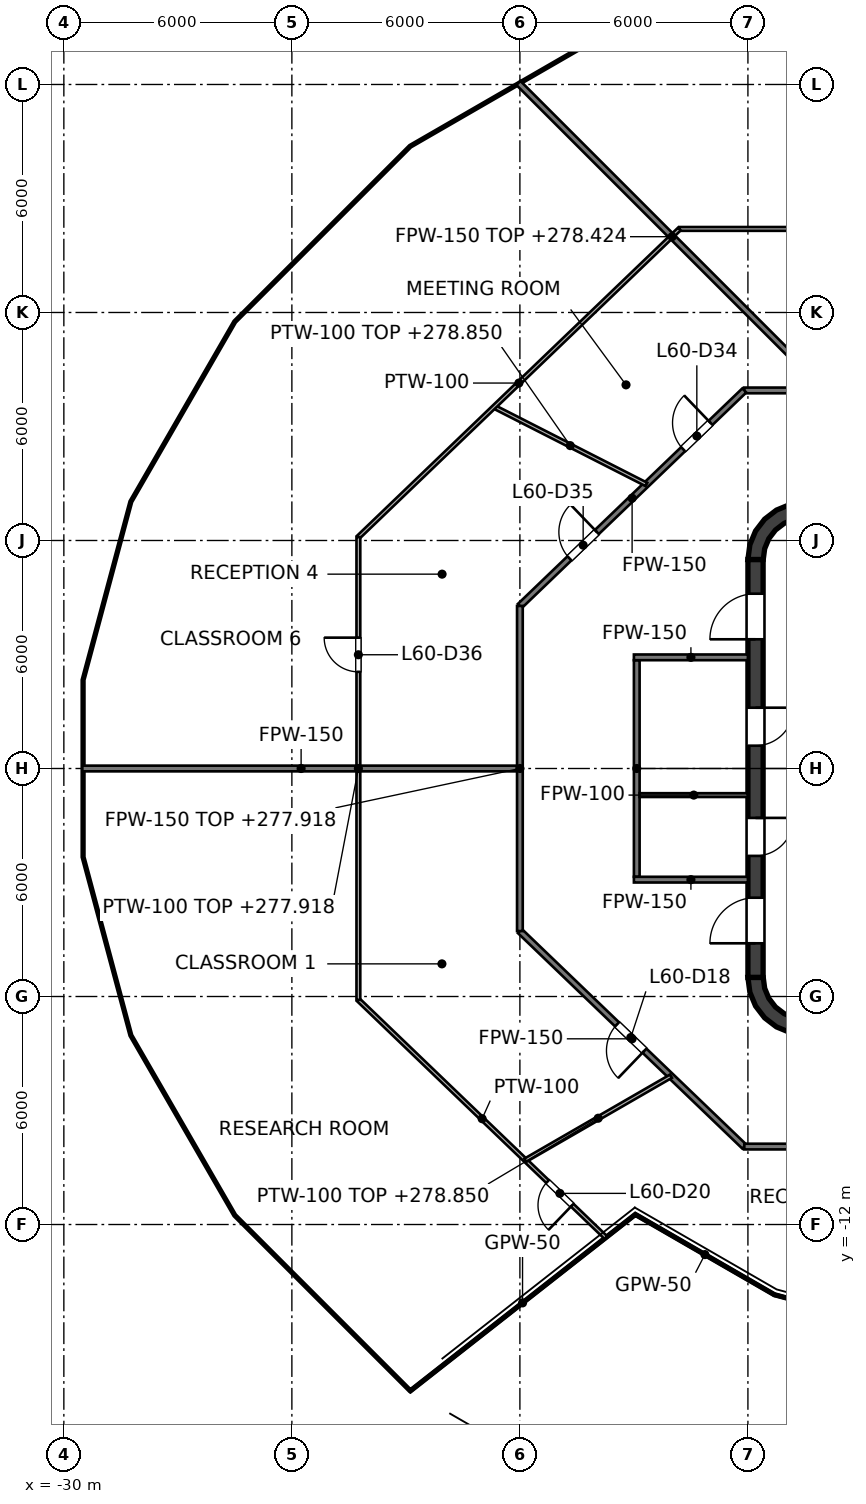
"""IFC4 building model, lengths in metres.
Left out: names, types, materials, properties, quantities, classifications, styles, units other than length and angle.
Written with IfcOpenShell. Run it as: python <this file> out.ifc"""

import sys

from ifc_helpers import new_model, si_unit, direction, frame, frame_2d, origin, place, context, subcontext, project, spatial, polyline, rectangle, outline, extrude, element, fill, save


model = new_model("IFC4")
c1 = context("Model", 3, precision=1e-05, world=origin(), true_north=direction((0.0, 1.0)))
c2 = subcontext(c1, "Body", "Model", "MODEL_VIEW")
j1 = project(units=[si_unit("LENGTHUNIT", "METRE"), si_unit("PLANEANGLEUNIT", "RADIAN")], contexts=[c1])
p1 = place(None, origin())
s1 = spatial("IfcSite", under=j1, at=p1, CompositionType="ELEMENT")
p2 = place(p1, origin())
s2 = spatial("IfcBuilding", under=s1, at=p2, CompositionType="ELEMENT")
p3 = place(p2, frame((0.0, 0.0, 275.0)))
s3 = spatial("IfcBuildingStorey", under=s2, at=p3, CompositionType="ELEMENT", Elevation=275.0)
p4 = place(p3, frame((-11.8, -5.5, 0.0), z_axis=(0.0, 0.0, 1.0), x_axis=(0.0, 1.0, 0.0)))
e1 = element("IfcWall", 1, at=p4, inside=s3, PredefinedType="SHEAR", context=c2, shape_type="SweptSolid", body=[
    extrude(rectangle(XDim=11.0, YDim=0.4, at=frame_2d((5.5, 0.0))), origin(), (0.0, 0.0, 1.0), 4.0),
])
p5 = place(p4, frame((3.2, 0.0, 0.0)))
e2 = element("IfcOpeningElement", 2, at=p5, cuts=e1, PredefinedType="OPENING", context=c2, shape_type="SweptSolid", body=[
    extrude(rectangle(XDim=1.0, YDim=2.1, at=frame_2d((0.5, 1.05))), frame((0.0, 0.2, 0.0), z_axis=(0.0, -1.0, 0.0), x_axis=(1.0, 0.0, 0.0)), (0.0, 0.0, 1.0), 0.4),
])
p6 = place(p4, frame((6.1, 0.0, 0.0)))
e3 = element("IfcOpeningElement", 3, at=p6, cuts=e1, PredefinedType="OPENING", context=c2, shape_type="SweptSolid", body=[
    extrude(rectangle(XDim=1.0, YDim=2.1, at=frame_2d((0.5, 1.05))), frame((0.0, 0.2, 0.0), z_axis=(0.0, -1.0, 0.0), x_axis=(1.0, 0.0, 0.0)), (0.0, 0.0, 1.0), 0.4),
])
p7 = place(p4, frame((0.9, 0.0, 0.0)))
e4 = element("IfcOpeningElement", 4, at=p7, cuts=e1, PredefinedType="OPENING", context=c2, shape_type="SweptSolid", body=[
    extrude(rectangle(XDim=1.2, YDim=2.1, at=frame_2d((0.6, 1.05))), frame((0.0, 0.2, 0.0), z_axis=(0.0, -1.0, 0.0), x_axis=(1.0, 0.0, 0.0)), (0.0, 0.0, 1.0), 0.4),
])
p8 = place(p4, frame((8.9, 0.0, 0.0)))
e5 = element("IfcOpeningElement", 5, at=p8, cuts=e1, PredefinedType="OPENING", context=c2, shape_type="SweptSolid", body=[
    extrude(rectangle(XDim=1.2, YDim=2.1, at=frame_2d((0.6, 1.05))), frame((0.0, 0.2, 0.0), z_axis=(0.0, -1.0, 0.0), x_axis=(1.0, 0.0, 0.0)), (0.0, 0.0, 1.0), 0.4),
])
p9 = place(p3, origin())
e6 = element("IfcWall", 6, at=p9, inside=s3, PredefinedType="SHEAR", context=c2, shape_type="SweptSolid", body=[
    extrude(outline(polyline([(-12.0, 5.5), (-11.596, 5.5), (-11.559, 5.784), (-11.45, 6.048), (-11.275, 6.275), (-11.048, 6.45), (-10.784, 6.559), (-10.5, 6.596), (-10.5, 7.0), (-10.888, 6.949), (-11.25, 6.799), (-11.561, 6.561), (-11.799, 6.25), (-11.949, 5.888), (-12.0, 5.5)])), origin(), (0.0, 0.0, 1.0), 4.0),
])
e7 = element("IfcWall", 7, at=p9, inside=s3, PredefinedType="SHEAR", context=c2, shape_type="SweptSolid", body=[
    extrude(outline(polyline([(-10.5, -7.0), (-10.5, -6.596), (-10.784, -6.559), (-11.048, -6.45), (-11.275, -6.275), (-11.45, -6.048), (-11.559, -5.784), (-11.596, -5.5), (-12.0, -5.5), (-11.949, -5.888), (-11.799, -6.25), (-11.561, -6.561), (-11.25, -6.799), (-10.888, -6.949), (-10.5, -7.0)])), origin(), (0.0, 0.0, 1.0), 4.0),
])
p10 = place(p3, frame((-14.925, -2.85, 0.0), z_axis=(0.0, 0.0, 1.0), x_axis=(0.0, 1.0, 0.0)))
e8 = element("IfcWall", 8, at=p10, inside=s3, PredefinedType="PARTITIONING", context=c2, shape_type="SweptSolid", body=[
    extrude(rectangle(XDim=5.7, YDim=0.15, at=frame_2d((2.85, 0.0))), origin(), (0.0, 0.0, 1.0), 2.918),
])
for number, where, z_axis, x_axis in (
    (9, (-15.0, 2.925, 0.0), (0.0, 0.0, 1.0), (1.0, 0.0, 0.0)),
    (10, (-15.0, -2.925, 0.0), (0.0, 0.0, 1.0), (1.0, 0.0, 0.0)),
):
    element("IfcWall", number, at=place(p3, frame(where, z_axis=z_axis, x_axis=x_axis)), inside=s3, PredefinedType="PARTITIONING", context=c2, shape_type="SweptSolid", body=[
        extrude(rectangle(XDim=3.0, YDim=0.15, at=frame_2d((1.5, 0.0))), origin(), (0.0, 0.0, 1.0), 2.927),
    ])
p11 = place(p3, frame((-14.85, -0.7, 0.0), z_axis=(0.0, 0.0, 1.0), x_axis=(1.0, 0.0, 0.0)))
e11 = element("IfcWall", 11, at=p11, inside=s3, PredefinedType="PARTITIONING", context=c2, shape_type="SweptSolid", body=[
    extrude(rectangle(XDim=2.85, YDim=0.1, at=frame_2d((1.425, 0.0))), origin(), (0.0, 0.0, 1.0), 3.85),
])
p12 = place(p3, frame((-18.04, 18.04, 0.0), z_axis=(0.0, 0.0, 1.0), x_axis=(0.707106781187, -0.707106781187, 0.0)))
e12 = element("IfcWall", 12, at=p12, inside=s3, PredefinedType="PARTITIONING", context=c2, shape_type="SweptSolid", body=[
    extrude(rectangle(XDim=11.442, YDim=0.15, at=frame_2d((5.721, 0.0))), origin(), (0.0, 0.0, 1.0), 3.424),
])
p13 = place(p3, frame((-18.0, -4.278, 0.0), z_axis=(0.0, 0.0, 1.0), x_axis=(0.721290181137, -0.692633001376, 0.0)))
e13 = element("IfcWall", 13, at=p13, inside=s3, PredefinedType="PARTITIONING", context=c2, shape_type="SweptSolid", body=[
    extrude(rectangle(XDim=8.187, YDim=0.15, at=frame_2d((4.094, 0.0))), origin(), (0.0, 0.0, 1.0), 2.927),
])
p14 = place(p13, frame((3.544, 0.0, 0.0)))
e14 = element("IfcOpeningElement", 14, at=p14, cuts=e13, PredefinedType="OPENING", context=c2, shape_type="SweptSolid", body=[
    extrude(rectangle(XDim=1.0, YDim=2.1, at=frame_2d((0.5, 1.05))), frame((0.0, 0.075, 0.0), z_axis=(0.0, -1.0, 0.0), x_axis=(1.0, 0.0, 0.0)), (0.0, 0.0, 1.0), 0.15),
])
p15 = place(p3, frame((-12.095, -9.949, 0.0), z_axis=(0.0, 0.0, 1.0), x_axis=(1.0, 0.0, 0.0)))
e15 = element("IfcWall", 15, at=p15, inside=s3, PredefinedType="PARTITIONING", context=c2, shape_type="SweptSolid", body=[
    extrude(rectangle(XDim=24.19, YDim=0.15, at=frame_2d((12.095, 0.0))), origin(), (0.0, 0.0, 1.0), 2.927),
])
p16 = place(p15, frame((4.215, 0.0, 0.0)))
e16 = element("IfcOpeningElement", 16, at=p16, cuts=e15, PredefinedType="OPENING", context=c2, shape_type="SweptSolid", body=[
    extrude(rectangle(XDim=1.0, YDim=2.1, at=frame_2d((0.5, 1.05))), frame((0.0, 0.075, 0.0), z_axis=(0.0, -1.0, 0.0), x_axis=(1.0, 0.0, 0.0)), (0.0, 0.0, 1.0), 0.15),
])
p17 = place(p15, frame((10.029, 0.0, 0.0)))
e17 = element("IfcOpeningElement", 17, at=p17, cuts=e15, PredefinedType="OPENING", context=c2, shape_type="SweptSolid", body=[
    extrude(rectangle(XDim=1.0, YDim=2.1, at=frame_2d((0.5, 1.05))), frame((0.0, 0.075, 0.0), z_axis=(0.0, -1.0, 0.0), x_axis=(1.0, 0.0, 0.0)), (0.0, 0.0, 1.0), 0.15),
])
p18 = place(p15, frame((16.297, 0.0, 0.0)))
e18 = element("IfcOpeningElement", 18, at=p18, cuts=e15, PredefinedType="OPENING", context=c2, shape_type="SweptSolid", body=[
    extrude(rectangle(XDim=1.0, YDim=2.1, at=frame_2d((0.5, 1.05))), frame((0.0, 0.075, 0.0), z_axis=(0.0, -1.0, 0.0), x_axis=(1.0, 0.0, 0.0)), (0.0, 0.0, 1.0), 0.15),
])
p19 = place(p3, frame((-29.514, 0.0, 0.0), z_axis=(0.0, 0.0, 1.0), x_axis=(1.0, 0.0, 0.0)))
e19 = element("IfcWall", 19, at=p19, inside=s3, PredefinedType="PARTITIONING", context=c2, shape_type="SweptSolid", body=[
    extrude(rectangle(XDim=11.514, YDim=0.15, at=frame_2d((5.757, 0.0))), origin(), (0.0, 0.0, 1.0), 2.927),
])
p20 = place(p3, frame((-12.095, 9.949, 0.0), z_axis=(0.0, 0.0, 1.0), x_axis=(1.0, 0.0, 0.0)))
e20 = element("IfcWall", 20, at=p20, inside=s3, PredefinedType="PARTITIONING", context=c2, shape_type="SweptSolid", body=[
    extrude(rectangle(XDim=24.19, YDim=0.15, at=frame_2d((12.095, 0.0))), origin(), (0.0, 0.0, 1.0), 2.927),
])
p21 = place(p20, frame((20.297, 0.0, 0.0)))
e21 = element("IfcOpeningElement", 21, at=p21, cuts=e20, PredefinedType="OPENING", context=c2, shape_type="SweptSolid", body=[
    extrude(rectangle(XDim=1.0, YDim=2.1, at=frame_2d((0.5, 1.05))), frame((0.0, 0.075, 0.0), z_axis=(0.0, -1.0, 0.0), x_axis=(1.0, 0.0, 0.0)), (0.0, 0.0, 1.0), 0.15),
])
p22 = place(p20, frame((16.269, 0.0, 0.0)))
e22 = element("IfcOpeningElement", 22, at=p22, cuts=e20, PredefinedType="OPENING", context=c2, shape_type="SweptSolid", body=[
    extrude(rectangle(XDim=1.0, YDim=2.1, at=frame_2d((0.5, 1.05))), frame((0.0, 0.075, 0.0), z_axis=(0.0, -1.0, 0.0), x_axis=(1.0, 0.0, 0.0)), (0.0, 0.0, 1.0), 0.15),
])
p23 = place(p20, frame((12.14, 0.0, 0.0)))
e23 = element("IfcOpeningElement", 23, at=p23, cuts=e20, PredefinedType="OPENING", context=c2, shape_type="SweptSolid", body=[
    extrude(rectangle(XDim=1.0, YDim=2.1, at=frame_2d((0.5, 1.05))), frame((0.0, 0.075, 0.0), z_axis=(0.0, -1.0, 0.0), x_axis=(1.0, 0.0, 0.0)), (0.0, 0.0, 1.0), 0.15),
])
p24 = place(p20, frame((5.782, 0.0, 0.0)))
e24 = element("IfcOpeningElement", 24, at=p24, cuts=e20, PredefinedType="OPENING", context=c2, shape_type="SweptSolid", body=[
    extrude(rectangle(XDim=1.0, YDim=2.1, at=frame_2d((0.5, 1.05))), frame((0.0, 0.075, 0.0), z_axis=(0.0, -1.0, 0.0), x_axis=(1.0, 0.0, 0.0)), (0.0, 0.0, 1.0), 0.15),
])
p25 = place(p3, frame((-18.0, 4.278, 0.0), z_axis=(0.0, 0.0, 1.0), x_axis=(0.721290181137, 0.692633001376, 0.0)))
e25 = element("IfcWall", 25, at=p25, inside=s3, PredefinedType="PARTITIONING", context=c2, shape_type="SweptSolid", body=[
    extrude(rectangle(XDim=8.187, YDim=0.15, at=frame_2d((4.094, 0.0))), origin(), (0.0, 0.0, 1.0), 2.927),
])
p26 = place(p25, frame((5.955, 0.0, 0.0)))
e26 = element("IfcOpeningElement", 26, at=p26, cuts=e25, PredefinedType="OPENING", context=c2, shape_type="SweptSolid", body=[
    extrude(rectangle(XDim=1.0, YDim=2.1, at=frame_2d((0.5, 1.05))), frame((0.0, 0.075, 0.0), z_axis=(0.0, -1.0, 0.0), x_axis=(1.0, 0.0, 0.0)), (0.0, 0.0, 1.0), 0.15),
])
p27 = place(p25, frame((1.808, 0.0, 0.0)))
e27 = element("IfcOpeningElement", 27, at=p27, cuts=e25, PredefinedType="OPENING", context=c2, shape_type="SweptSolid", body=[
    extrude(rectangle(XDim=1.0, YDim=2.1, at=frame_2d((0.5, 1.05))), frame((0.0, 0.075, 0.0), z_axis=(0.0, -1.0, 0.0), x_axis=(1.0, 0.0, 0.0)), (0.0, 0.0, 1.0), 0.15),
])
p28 = place(p3, frame((-18.0, -4.278, 0.0), z_axis=(0.0, 0.0, 1.0), x_axis=(0.0, 1.0, 0.0)))
e28 = element("IfcWall", 28, at=p28, inside=s3, PredefinedType="PARTITIONING", context=c2, shape_type="SweptSolid", body=[
    extrude(rectangle(XDim=8.556, YDim=0.15, at=frame_2d((4.278, 0.0))), origin(), (0.0, 0.0, 1.0), 2.918),
])
p29 = place(p3, frame((-14.962, -11.735, 0.0), z_axis=(0.0, 0.0, 1.0), x_axis=(0.866051866393, -0.499954162615, 0.0)))
e29 = element("IfcWall", 29, at=p29, inside=s3, PredefinedType="PARTITIONING", context=c2, shape_type="SweptSolid", body=[
    extrude(rectangle(XDim=4.226, YDim=0.05, at=frame_2d((2.113, 0.0))), origin(), (0.0, 0.0, 1.0), 2.927),
])
p30 = place(p3, frame((-11.302, -13.848, 0.0), z_axis=(0.0, 0.0, 1.0), x_axis=(0.966071658889, -0.258274175814, 0.0)))
e30 = element("IfcWall", 30, at=p30, inside=s3, PredefinedType="PARTITIONING", context=c2, shape_type="SweptSolid", body=[
    extrude(rectangle(XDim=7.504, YDim=0.05, at=frame_2d((3.752, 0.0))), origin(), (0.0, 0.0, 1.0), 2.927),
])
p31 = place(p3, frame((-20.899, -16.39, 0.0), z_axis=(0.0, 0.0, 1.0), x_axis=(0.787046572899, 0.616893582467, 0.0)))
e31 = element("IfcWall", 31, at=p31, inside=s3, PredefinedType="PARTITIONING", context=c2, shape_type="SweptSolid", body=[
    extrude(rectangle(XDim=7.544, YDim=0.05, at=frame_2d((3.772, 0.0))), origin(), (0.0, 0.0, 1.0), 2.927),
])
p32 = place(p3, frame((-22.25, -6.089, 0.0), z_axis=(0.0, 0.0, 1.0), x_axis=(0.72125329794, -0.692671408542, 0.0)))
e32 = element("IfcWall", 32, at=p32, inside=s3, PredefinedType="PARTITIONING", context=c2, shape_type="SweptSolid", body=[
    extrude(rectangle(XDim=9.029, YDim=0.1, at=frame_2d((4.514, 0.0))), origin(), (0.0, 0.0, 1.0), 2.927),
])
p33 = place(p32, frame((6.901, 0.0, 0.0)))
e33 = element("IfcOpeningElement", 33, at=p33, cuts=e32, PredefinedType="OPENING", context=c2, shape_type="SweptSolid", body=[
    extrude(rectangle(XDim=0.9, YDim=2.1, at=frame_2d((0.45, 1.05))), frame((0.0, 0.05, 0.0), z_axis=(0.0, -1.0, 0.0), x_axis=(1.0, 0.0, 0.0)), (0.0, 0.0, 1.0), 0.1),
])
p34 = place(p3, frame((-18.68, 9.518, 0.0), z_axis=(0.0, 0.0, 1.0), x_axis=(0.890982762067, -0.454037132512, 0.0)))
e34 = element("IfcWall", 34, at=p34, inside=s3, PredefinedType="PARTITIONING", context=c2, shape_type="SweptSolid", body=[
    extrude(rectangle(XDim=4.5, YDim=0.1, at=frame_2d((2.25, 0.0))), origin(), (0.0, 0.0, 1.0), 3.85),
])
p35 = place(p3, frame((-13.805, 14.199, 0.0), z_axis=(0.0, 0.0, 1.0), x_axis=(1.0, 0.0, 0.0)))
e35 = element("IfcWall", 35, at=p35, inside=s3, PredefinedType="PARTITIONING", context=c2, shape_type="SweptSolid", body=[
    extrude(rectangle(XDim=27.61, YDim=0.1, at=frame_2d((13.805, 0.0))), origin(), (0.0, 0.0, 1.0), 2.927),
])
p36 = place(p35, frame((20.047, 0.0, 0.0)))
e36 = element("IfcOpeningElement", 36, at=p36, cuts=e35, PredefinedType="OPENING", context=c2, shape_type="SweptSolid", body=[
    extrude(rectangle(XDim=0.9, YDim=2.1, at=frame_2d((0.45, 1.05))), frame((0.0, 0.05, 0.0), z_axis=(0.0, -1.0, 0.0), x_axis=(1.0, 0.0, 0.0)), (0.0, 0.0, 1.0), 0.1),
])
p37 = place(p35, frame((4.928, 0.0, 0.0)))
e37 = element("IfcOpeningElement", 37, at=p37, cuts=e35, PredefinedType="OPENING", context=c2, shape_type="SweptSolid", body=[
    extrude(rectangle(XDim=1.8, YDim=2.1, at=frame_2d((0.9, 1.05))), frame((0.0, 0.05, 0.0), z_axis=(0.0, -1.0, 0.0), x_axis=(1.0, 0.0, 0.0)), (0.0, 0.0, 1.0), 0.1),
])
p38 = place(p3, frame((-17.856, -10.309, 0.0), z_axis=(0.0, 0.0, 1.0), x_axis=(0.866051440883, 0.49995489971, 0.0)))
e38 = element("IfcWall", 38, at=p38, inside=s3, PredefinedType="PARTITIONING", context=c2, shape_type="SweptSolid", body=[
    extrude(rectangle(XDim=4.425, YDim=0.1, at=frame_2d((2.212, 0.0))), origin(), (0.0, 0.0, 1.0), 3.85),
])
p39 = place(p3, frame((-22.25, 6.089, 0.0), z_axis=(0.0, 0.0, 1.0), x_axis=(0.721439820897, 0.69247713668, 0.0)))
e39 = element("IfcWall", 39, at=p39, inside=s3, PredefinedType="PARTITIONING", context=c2, shape_type="SweptSolid", body=[
    extrude(rectangle(XDim=11.708, YDim=0.1, at=frame_2d((5.854, 0.0))), origin(), (0.0, 0.0, 1.0), 2.927),
])
p40 = place(p3, frame((-22.25, -6.089, 0.0), z_axis=(0.0, 0.0, 1.0), x_axis=(0.0, 1.0, 0.0)))
e40 = element("IfcWall", 40, at=p40, inside=s3, PredefinedType="PARTITIONING", context=c2, shape_type="SweptSolid", body=[
    extrude(rectangle(XDim=12.178, YDim=0.1, at=frame_2d((6.089, 0.0))), origin(), (0.0, 0.0, 1.0), 2.918),
])
p41 = place(p40, frame((8.632, 0.0, 0.0)))
e41 = element("IfcOpeningElement", 41, at=p41, cuts=e40, PredefinedType="OPENING", context=c2, shape_type="SweptSolid", body=[
    extrude(rectangle(XDim=0.9, YDim=2.1, at=frame_2d((0.45, 1.05))), frame((0.0, 0.05, 0.0), z_axis=(0.0, -1.0, 0.0), x_axis=(1.0, 0.0, 0.0)), (0.0, 0.0, 1.0), 0.1),
])
p42 = place(p5, origin())
e42 = element("IfcDoor", 42, at=p42, inside=s3, OperationType="SINGLE_SWING_RIGHT", PredefinedType="DOOR", context=c2, shape_type="SweptSolid", body=[
    extrude(rectangle(XDim=1.0, YDim=2.1, at=frame_2d((0.5, 1.05))), frame((0.0, 0.025, 0.0), z_axis=(0.0, -1.0, 0.0), x_axis=(1.0, 0.0, 0.0)), (0.0, 0.0, 1.0), 0.05),
])
fill(e2, e42)
p43 = place(p6, origin())
e43 = element("IfcDoor", 43, at=p43, inside=s3, OperationType="SINGLE_SWING_RIGHT", PredefinedType="DOOR", context=c2, shape_type="SweptSolid", body=[
    extrude(rectangle(XDim=1.0, YDim=2.1, at=frame_2d((0.5, 1.05))), frame((0.0, 0.025, 0.0), z_axis=(0.0, -1.0, 0.0), x_axis=(1.0, 0.0, 0.0)), (0.0, 0.0, 1.0), 0.05),
])
fill(e3, e43)
p44 = place(p7, origin())
e44 = element("IfcDoor", 44, at=p44, inside=s3, OperationType="SINGLE_SWING_LEFT", PredefinedType="DOOR", context=c2, shape_type="SweptSolid", body=[
    extrude(rectangle(XDim=1.2, YDim=2.1, at=frame_2d((0.6, 1.05))), frame((0.0, 0.025, 0.0), z_axis=(0.0, -1.0, 0.0), x_axis=(1.0, 0.0, 0.0)), (0.0, 0.0, 1.0), 0.05),
])
fill(e4, e44)
p45 = place(p8, origin())
e45 = element("IfcDoor", 45, at=p45, inside=s3, OperationType="SINGLE_SWING_LEFT", PredefinedType="DOOR", context=c2, shape_type="SweptSolid", body=[
    extrude(rectangle(XDim=1.2, YDim=2.1, at=frame_2d((0.6, 1.05))), frame((0.0, 0.025, 0.0), z_axis=(0.0, -1.0, 0.0), x_axis=(1.0, 0.0, 0.0)), (0.0, 0.0, 1.0), 0.05),
])
fill(e5, e45)
p46 = place(p14, origin())
e46 = element("IfcDoor", 46, at=p46, inside=s3, OperationType="SINGLE_SWING_RIGHT", PredefinedType="DOOR", context=c2, shape_type="SweptSolid", body=[
    extrude(rectangle(XDim=1.0, YDim=2.1, at=frame_2d((0.5, 1.05))), frame((0.0, 0.025, 0.0), z_axis=(0.0, -1.0, 0.0), x_axis=(1.0, 0.0, 0.0)), (0.0, 0.0, 1.0), 0.05),
])
fill(e14, e46)
p47 = place(p33, origin())
e47 = element("IfcDoor", 47, at=p47, inside=s3, OperationType="SINGLE_SWING_RIGHT", PredefinedType="DOOR", context=c2, shape_type="SweptSolid", body=[
    extrude(rectangle(XDim=0.9, YDim=2.1, at=frame_2d((0.45, 1.05))), frame((0.0, 0.025, 0.0), z_axis=(0.0, -1.0, 0.0), x_axis=(1.0, 0.0, 0.0)), (0.0, 0.0, 1.0), 0.05),
])
fill(e33, e47)
p48 = place(p26, origin())
e48 = element("IfcDoor", 48, at=p48, inside=s3, OperationType="SINGLE_SWING_RIGHT", PredefinedType="DOOR", context=c2, shape_type="SweptSolid", body=[
    extrude(rectangle(XDim=1.0, YDim=2.1, at=frame_2d((0.5, 1.05))), frame((0.0, 0.025, 0.0), z_axis=(0.0, -1.0, 0.0), x_axis=(1.0, 0.0, 0.0)), (0.0, 0.0, 1.0), 0.05),
])
fill(e26, e48)
p49 = place(p27, origin())
e49 = element("IfcDoor", 49, at=p49, inside=s3, OperationType="SINGLE_SWING_RIGHT", PredefinedType="DOOR", context=c2, shape_type="SweptSolid", body=[
    extrude(rectangle(XDim=1.0, YDim=2.1, at=frame_2d((0.5, 1.05))), frame((0.0, 0.025, 0.0), z_axis=(0.0, -1.0, 0.0), x_axis=(1.0, 0.0, 0.0)), (0.0, 0.0, 1.0), 0.05),
])
fill(e27, e49)
p50 = place(p41, origin())
e50 = element("IfcDoor", 50, at=p50, inside=s3, OperationType="SINGLE_SWING_RIGHT", PredefinedType="DOOR", context=c2, shape_type="SweptSolid", body=[
    extrude(rectangle(XDim=0.9, YDim=2.1, at=frame_2d((0.45, 1.05))), frame((0.0, 0.025, 0.0), z_axis=(0.0, -1.0, 0.0), x_axis=(1.0, 0.0, 0.0)), (0.0, 0.0, 1.0), 0.05),
])
fill(e41, e50)
save(model, sys.argv[1])
